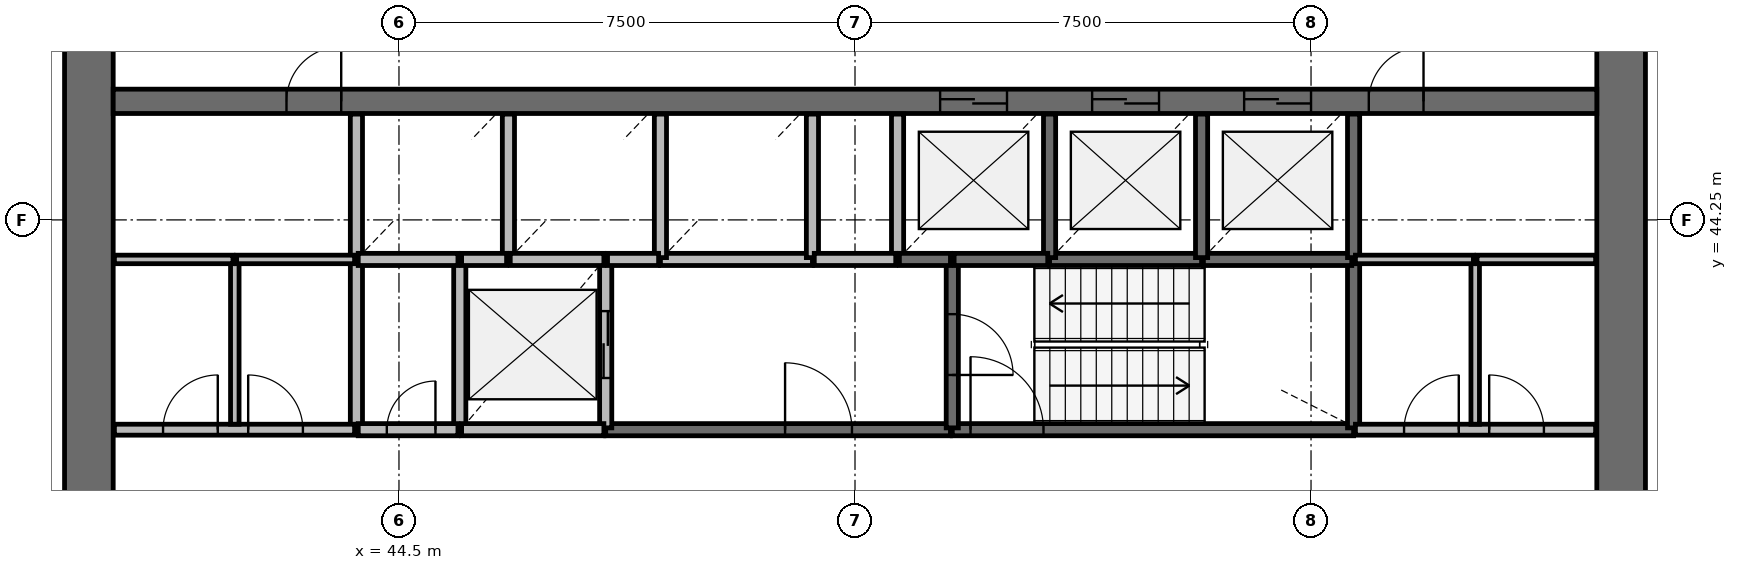
"""IFC4 building model, lengths in metres.
Left out: names, types, materials, properties, quantities, classifications, styles, units other than length and angle.
Written with IfcOpenShell. Run it as: python <this file> out.ifc"""

import sys

from ifc_helpers import new_model, si_unit, direction, frame, frame_2d, origin, place, context, subcontext, project, spatial, rectangle, extrude, source, transform, mapped, element, fill, save


model = new_model("IFC4")
c1 = context("Model", 3, precision=1e-05, world=origin(), true_north=direction((0.0, 1.0)))
c2 = subcontext(c1, "Body", "Model", "MODEL_VIEW")
j1 = project(units=[si_unit("LENGTHUNIT", "METRE"), si_unit("PLANEANGLEUNIT", "RADIAN")], contexts=[c1])
p1 = place(None, origin())
s1 = spatial("IfcSite", under=j1, at=p1, CompositionType="ELEMENT")
p2 = place(p1, origin())
s2 = spatial("IfcBuilding", under=s1, at=p2, CompositionType="ELEMENT")
p3 = place(p2, frame((0.0, 0.0, 137.0)))
s3 = spatial("IfcBuildingStorey", under=s2, at=p3, CompositionType="ELEMENT", Elevation=137.0)
p4 = place(p3, frame((64.6, 38.0, 0.0), z_axis=(0.0, 0.0, 1.0), x_axis=(0.0, 1.0, 0.0)))
e1 = element("IfcWall", 1, at=p4, inside=s3, PredefinedType="SHEAR", context=c2, shape_type="SweptSolid", body=[
    extrude(rectangle(XDim=20.0, YDim=0.8, at=frame_2d((10.0, 0.0))), origin(), (0.0, 0.0, 1.0), 3.9),
])
p5 = place(p4, frame((9.1, 0.0, 0.0)))
e2 = element("IfcOpeningElement", 2, at=p5, cuts=e1, PredefinedType="OPENING", context=c2, shape_type="SweptSolid", body=[
    extrude(rectangle(XDim=1.8, YDim=2.1, at=frame_2d((0.9, 1.05))), frame((0.0, 0.41, 0.0), z_axis=(0.0, -1.0, 0.0), x_axis=(1.0, 0.0, 0.0)), (0.0, 0.0, 1.0), 0.82),
])
p6 = place(p3, frame((39.4, 58.0, 0.0), z_axis=(0.0, 0.0, 1.0), x_axis=(0.0, -1.0, 0.0)))
e3 = element("IfcWall", 3, at=p6, inside=s3, PredefinedType="SHEAR", context=c2, shape_type="SweptSolid", body=[
    extrude(rectangle(XDim=20.0, YDim=0.8, at=frame_2d((10.0, 0.0))), origin(), (0.0, 0.0, 1.0), 3.9),
])
p7 = place(p6, frame((9.1, 0.0, 0.0)))
e4 = element("IfcOpeningElement", 4, at=p7, cuts=e3, PredefinedType="OPENING", context=c2, shape_type="SweptSolid", body=[
    extrude(rectangle(XDim=1.8, YDim=2.1, at=frame_2d((0.9, 1.05))), frame((0.0, 0.41, 0.0), z_axis=(0.0, -1.0, 0.0), x_axis=(1.0, 0.0, 0.0)), (0.0, 0.0, 1.0), 0.82),
])
p8 = place(p3, frame((39.8, 46.2, 0.0), z_axis=(0.0, 0.0, 1.0), x_axis=(1.0, 0.0, 0.0)))
e5 = element("IfcWall", 5, at=p8, inside=s3, PredefinedType="SHEAR", context=c2, shape_type="SweptSolid", body=[
    extrude(rectangle(XDim=24.4, YDim=0.4, at=frame_2d((12.2, 0.0))), origin(), (0.0, 0.0, 1.0), 3.9),
])
p9 = place(p8, frame((13.6, 0.0, 0.0)))
e6 = element("IfcOpeningElement", 6, at=p9, cuts=e5, PredefinedType="OPENING", context=c2, shape_type="SweptSolid", body=[
    extrude(rectangle(XDim=1.1, YDim=2.1, at=frame_2d((0.55, 1.05))), frame((0.0, 0.21, 0.0), z_axis=(0.0, -1.0, 0.0), x_axis=(1.0, 0.0, 0.0)), (0.0, 0.0, 1.0), 0.42),
])
p10 = place(p8, frame((16.1, 0.0, 0.0)))
e7 = element("IfcOpeningElement", 7, at=p10, cuts=e5, PredefinedType="OPENING", context=c2, shape_type="SweptSolid", body=[
    extrude(rectangle(XDim=1.1, YDim=2.1, at=frame_2d((0.55, 1.05))), frame((0.0, 0.21, 0.0), z_axis=(0.0, -1.0, 0.0), x_axis=(1.0, 0.0, 0.0)), (0.0, 0.0, 1.0), 0.42),
])
p11 = place(p8, frame((18.6, 0.0, 0.0)))
e8 = element("IfcOpeningElement", 8, at=p11, cuts=e5, PredefinedType="OPENING", context=c2, shape_type="SweptSolid", body=[
    extrude(rectangle(XDim=1.1, YDim=2.1, at=frame_2d((0.55, 1.05))), frame((0.0, 0.21, 0.0), z_axis=(0.0, -1.0, 0.0), x_axis=(1.0, 0.0, 0.0)), (0.0, 0.0, 1.0), 0.42),
])
p12 = place(p8, frame((20.65, 0.0, 0.0)))
e9 = element("IfcOpeningElement", 9, at=p12, cuts=e5, PredefinedType="OPENING", context=c2, shape_type="SweptSolid", body=[
    extrude(rectangle(XDim=0.9, YDim=2.1, at=frame_2d((0.45, 1.05))), frame((0.0, 0.21, 0.0), z_axis=(0.0, -1.0, 0.0), x_axis=(1.0, 0.0, 0.0)), (0.0, 0.0, 1.0), 0.42),
])
p13 = place(p8, frame((2.85, 0.0, 0.0)))
e10 = element("IfcOpeningElement", 10, at=p13, cuts=e5, PredefinedType="OPENING", context=c2, shape_type="SweptSolid", body=[
    extrude(rectangle(XDim=0.9, YDim=2.1, at=frame_2d((0.45, 1.05))), frame((0.0, 0.21, 0.0), z_axis=(0.0, -1.0, 0.0), x_axis=(1.0, 0.0, 0.0)), (0.0, 0.0, 1.0), 0.42),
])
p14 = place(p3, frame((53.6, 40.8, 0.0), z_axis=(0.0, 0.0, 1.0), x_axis=(1.0, 0.0, 0.0)))
e11 = element("IfcWall", 11, at=p14, inside=s3, PredefinedType="SOLIDWALL", context=c2, shape_type="SweptSolid", body=[
    extrude(rectangle(XDim=6.6, YDim=0.2, at=frame_2d((3.3, 0.0))), origin(), (0.0, 0.0, 1.0), 3.58),
])
p15 = place(p14, frame((0.3, 0.0, 0.0)))
e12 = element("IfcOpeningElement", 12, at=p15, cuts=e11, PredefinedType="OPENING", context=c2, shape_type="SweptSolid", body=[
    extrude(rectangle(XDim=1.2, YDim=2.1, at=frame_2d((0.6, 1.05))), frame((0.0, 0.11, 0.0), z_axis=(0.0, -1.0, 0.0), x_axis=(1.0, 0.0, 0.0)), (0.0, 0.0, 1.0), 0.22),
])
p16 = place(p3, frame((47.9, 40.8, 0.0), z_axis=(0.0, 0.0, 1.0), x_axis=(1.0, 0.0, 0.0)))
e13 = element("IfcWall", 13, at=p16, inside=s3, PredefinedType="SOLIDWALL", context=c2, shape_type="SweptSolid", body=[
    extrude(rectangle(XDim=5.67, YDim=0.2, at=frame_2d((2.835, 0.0))), origin(), (0.0, 0.0, 1.0), 3.58),
])
p17 = place(p16, frame((2.95, 0.0, 0.0)))
e14 = element("IfcOpeningElement", 14, at=p17, cuts=e13, PredefinedType="OPENING", context=c2, shape_type="SweptSolid", body=[
    extrude(rectangle(XDim=1.1, YDim=2.1, at=frame_2d((0.55, 1.05))), frame((0.0, 0.11, 0.0), z_axis=(0.0, -1.0, 0.0), x_axis=(1.0, 0.0, 0.0)), (0.0, 0.0, 1.0), 0.22),
])
for number, where, z_axis, x_axis in (
    (15, (43.8, 43.6, 0.0), (0.0, 0.0, 1.0), (0.0, -1.0, 0.0)),
    (16, (45.5, 43.6, 0.0), (0.0, 0.0, 1.0), (0.0, -1.0, 0.0)),
):
    element("IfcWall", number, at=place(p3, frame(where, z_axis=z_axis, x_axis=x_axis)), inside=s3, PredefinedType="SOLIDWALL", context=c2, shape_type="SweptSolid", body=[
        extrude(rectangle(XDim=2.8, YDim=0.2, at=frame_2d((1.4, 0.0))), origin(), (0.0, 0.0, 1.0), 3.58),
    ])
p18 = place(p3, frame((47.9, 40.83, 0.0), z_axis=(0.0, 0.0, 1.0), x_axis=(0.0, 1.0, 0.0)))
e17 = element("IfcWall", 17, at=p18, inside=s3, PredefinedType="SOLIDWALL", context=c2, shape_type="SweptSolid", body=[
    extrude(rectangle(XDim=2.77, YDim=0.2, at=frame_2d((1.385, 0.0))), origin(), (0.0, 0.0, 1.0), 3.58),
])
p19 = place(p18, frame((0.82, 0.0, 0.0)))
e18 = element("IfcOpeningElement", 18, at=p19, cuts=e17, PredefinedType="OPENING", context=c2, shape_type="SweptSolid", body=[
    extrude(rectangle(XDim=1.1, YDim=2.1, at=frame_2d((0.55, 1.05))), frame((0.0, 0.11, 0.0), z_axis=(0.0, -1.0, 0.0), x_axis=(1.0, 0.0, 0.0)), (0.0, 0.0, 1.0), 0.22),
])
p20 = place(p3, frame((60.2, 40.83, 0.0), z_axis=(0.0, 0.0, 1.0), x_axis=(0.0, 1.0, 0.0)))
e19 = element("IfcWall", 19, at=p20, inside=s3, PredefinedType="SOLIDWALL", context=c2, shape_type="SweptSolid", body=[
    extrude(rectangle(XDim=2.77, YDim=0.2, at=frame_2d((1.385, 0.0))), origin(), (0.0, 0.0, 1.0), 3.58),
])
p21 = place(p3, frame((53.6, 43.6, 0.0), z_axis=(0.0, 0.0, 1.0), x_axis=(0.0, -1.0, 0.0)))
e20 = element("IfcWall", 20, at=p21, inside=s3, PredefinedType="SOLIDWALL", context=c2, shape_type="SweptSolid", body=[
    extrude(rectangle(XDim=2.77, YDim=0.2, at=frame_2d((1.385, 0.0))), origin(), (0.0, 0.0, 1.0), 3.58),
])
p22 = place(p21, frame((0.9, 0.0, 0.0)))
e21 = element("IfcOpeningElement", 21, at=p22, cuts=e20, PredefinedType="OPENING", context=c2, shape_type="SweptSolid", body=[
    extrude(rectangle(XDim=1.0, YDim=2.1, at=frame_2d((0.5, 1.05))), frame((0.0, 0.11, 0.0), z_axis=(0.0, -1.0, 0.0), x_axis=(1.0, 0.0, 0.0)), (0.0, 0.0, 1.0), 0.22),
])
for number, where, z_axis, x_axis in (
    (22, (48.8, 43.6, 0.0), (0.0, 0.0, 1.0), (1.0, 0.0, 0.0)),
    (23, (55.2, 43.6, 0.0), (0.0, 0.0, 1.0), (1.0, 0.0, 0.0)),
):
    element("IfcWall", number, at=place(p3, frame(where, z_axis=z_axis, x_axis=x_axis)), inside=s3, PredefinedType="SOLIDWALL", context=c2, shape_type="SweptSolid", body=[
        extrude(rectangle(XDim=2.5, YDim=0.2, at=frame_2d((1.25, 0.0))), origin(), (0.0, 0.0, 1.0), 3.58),
    ])
p23 = place(p3, frame((57.73, 43.6, 0.0), z_axis=(0.0, 0.0, 1.0), x_axis=(1.0, 0.0, 0.0)))
e24 = element("IfcWall", 24, at=p23, inside=s3, PredefinedType="SOLIDWALL", context=c2, shape_type="SweptSolid", body=[
    extrude(rectangle(XDim=2.44, YDim=0.2, at=frame_2d((1.22, 0.0))), origin(), (0.0, 0.0, 1.0), 3.58),
])
p24 = place(p3, frame((45.53, 40.8, 0.0), z_axis=(0.0, 0.0, 1.0), x_axis=(1.0, 0.0, 0.0)))
e25 = element("IfcWall", 25, at=p24, inside=s3, PredefinedType="SOLIDWALL", context=c2, shape_type="SweptSolid", body=[
    extrude(rectangle(XDim=2.34, YDim=0.2, at=frame_2d((1.17, 0.0))), origin(), (0.0, 0.0, 1.0), 3.58),
])
p25 = place(p3, frame((43.8, 45.99, 0.0), z_axis=(0.0, 0.0, 1.0), x_axis=(0.0, -1.0, 0.0)))
e26 = element("IfcWall", 26, at=p25, inside=s3, PredefinedType="SOLIDWALL", context=c2, shape_type="SweptSolid", body=[
    extrude(rectangle(XDim=2.36, YDim=0.2, at=frame_2d((1.18, 0.0))), origin(), (0.0, 0.0, 1.0), 3.58),
])
p26 = place(p3, frame((46.3, 43.6, 0.0), z_axis=(0.0, 0.0, 1.0), x_axis=(0.0, 1.0, 0.0)))
e27 = element("IfcWall", 27, at=p26, inside=s3, PredefinedType="SOLIDWALL", context=c2, shape_type="SweptSolid", body=[
    extrude(rectangle(XDim=2.39, YDim=0.2, at=frame_2d((1.195, 0.0))), origin(), (0.0, 0.0, 1.0), 3.58),
])
for number, where, z_axis, x_axis in (
    (28, (48.8, 43.63, 0.0), (0.0, 0.0, 1.0), (0.0, 1.0, 0.0)),
    (29, (51.3, 43.63, 0.0), (0.0, 0.0, 1.0), (0.0, 1.0, 0.0)),
):
    element("IfcWall", number, at=place(p3, frame(where, z_axis=z_axis, x_axis=x_axis)), inside=s3, PredefinedType="SOLIDWALL", context=c2, shape_type="SweptSolid", body=[
        extrude(rectangle(XDim=2.36, YDim=0.2, at=frame_2d((1.18, 0.0))), origin(), (0.0, 0.0, 1.0), 3.58),
    ])
p27 = place(p3, frame((52.7, 45.99, 0.0), z_axis=(0.0, 0.0, 1.0), x_axis=(0.0, -1.0, 0.0)))
e30 = element("IfcWall", 30, at=p27, inside=s3, PredefinedType="SOLIDWALL", context=c2, shape_type="SweptSolid", body=[
    extrude(rectangle(XDim=2.39, YDim=0.2, at=frame_2d((1.195, 0.0))), origin(), (0.0, 0.0, 1.0), 3.58),
])
for number, where, z_axis, x_axis in (
    (31, (55.2, 43.63, 0.0), (0.0, 0.0, 1.0), (0.0, 1.0, 0.0)),
    (32, (57.7, 43.63, 0.0), (0.0, 0.0, 1.0), (0.0, 1.0, 0.0)),
    (33, (60.2, 43.63, 0.0), (0.0, 0.0, 1.0), (0.0, 1.0, 0.0)),
):
    element("IfcWall", number, at=place(p3, frame(where, z_axis=z_axis, x_axis=x_axis)), inside=s3, PredefinedType="SOLIDWALL", context=c2, shape_type="SweptSolid", body=[
        extrude(rectangle(XDim=2.36, YDim=0.2, at=frame_2d((1.18, 0.0))), origin(), (0.0, 0.0, 1.0), 3.58),
    ])
p28 = place(p3, frame((43.83, 43.6, 0.0), z_axis=(0.0, 0.0, 1.0), x_axis=(1.0, 0.0, 0.0)))
e34 = element("IfcWall", 34, at=p28, inside=s3, PredefinedType="SOLIDWALL", context=c2, shape_type="SweptSolid", body=[
    extrude(rectangle(XDim=1.64, YDim=0.2, at=frame_2d((0.82, 0.0))), origin(), (0.0, 0.0, 1.0), 3.58),
])
p29 = place(p3, frame((43.83, 40.8, 0.0), z_axis=(0.0, 0.0, 1.0), x_axis=(1.0, 0.0, 0.0)))
e35 = element("IfcWall", 35, at=p29, inside=s3, PredefinedType="SOLIDWALL", context=c2, shape_type="SweptSolid", body=[
    extrude(rectangle(XDim=1.64, YDim=0.2, at=frame_2d((0.82, 0.0))), origin(), (0.0, 0.0, 1.0), 3.58),
])
p30 = place(p29, frame((0.47, 0.0, 0.0)))
e36 = element("IfcOpeningElement", 36, at=p30, cuts=e35, PredefinedType="OPENING", context=c2, shape_type="SweptSolid", body=[
    extrude(rectangle(XDim=0.8, YDim=2.1, at=frame_2d((0.4, 1.05))), frame((0.0, 0.11, 0.0), z_axis=(0.0, -1.0, 0.0), x_axis=(1.0, 0.0, 0.0)), (0.0, 0.0, 1.0), 0.22),
])
for number, where, z_axis, x_axis in (
    (37, (46.33, 43.6, 0.0), (0.0, 0.0, 1.0), (1.0, 0.0, 0.0)),
    (38, (53.63, 43.6, 0.0), (0.0, 0.0, 1.0), (1.0, 0.0, 0.0)),
):
    element("IfcWall", number, at=place(p3, frame(where, z_axis=z_axis, x_axis=x_axis)), inside=s3, PredefinedType="SOLIDWALL", context=c2, shape_type="SweptSolid", body=[
        extrude(rectangle(XDim=1.54, YDim=0.2, at=frame_2d((0.77, 0.0))), origin(), (0.0, 0.0, 1.0), 3.58),
    ])
p31 = place(p3, frame((52.67, 43.6, 0.0), z_axis=(0.0, 0.0, 1.0), x_axis=(-1.0, 0.0, 0.0)))
e39 = element("IfcWall", 39, at=p31, inside=s3, PredefinedType="SOLIDWALL", context=c2, shape_type="SweptSolid", body=[
    extrude(rectangle(XDim=1.34, YDim=0.2, at=frame_2d((0.67, 0.0))), origin(), (0.0, 0.0, 1.0), 3.58),
])
for number, where, z_axis, x_axis in (
    (40, (47.93, 43.6, 0.0), (0.0, 0.0, 1.0), (1.0, 0.0, 0.0)),
    (41, (52.73, 43.6, 0.0), (0.0, 0.0, 1.0), (1.0, 0.0, 0.0)),
):
    element("IfcWall", number, at=place(p3, frame(where, z_axis=z_axis, x_axis=x_axis)), inside=s3, PredefinedType="SOLIDWALL", context=c2, shape_type="SweptSolid", body=[
        extrude(rectangle(XDim=0.84, YDim=0.2, at=frame_2d((0.42, 0.0))), origin(), (0.0, 0.0, 1.0), 3.58),
    ])
p32 = place(p3, frame((45.53, 43.6, 0.0), z_axis=(0.0, 0.0, 1.0), x_axis=(1.0, 0.0, 0.0)))
e42 = element("IfcWall", 42, at=p32, inside=s3, PredefinedType="SOLIDWALL", context=c2, shape_type="SweptSolid", body=[
    extrude(rectangle(XDim=0.74, YDim=0.2, at=frame_2d((0.37, 0.0))), origin(), (0.0, 0.0, 1.0), 3.58),
])
p33 = place(p3, frame((60.23, 40.8, 0.0), z_axis=(0.0, 0.0, 1.0), x_axis=(1.0, 0.0, 0.0)))
e43 = element("IfcWall", 43, at=p33, inside=s3, PredefinedType="PARTITIONING", context=c2, shape_type="SweptSolid", body=[
    extrude(rectangle(XDim=3.95, YDim=0.18, at=frame_2d((1.975, 0.0))), origin(), (0.0, 0.0, 1.0), 2.7),
])
p34 = place(p33, frame((0.8, 0.0, 0.0)))
e44 = element("IfcOpeningElement", 44, at=p34, cuts=e43, PredefinedType="OPENING", context=c2, shape_type="SweptSolid", body=[
    extrude(rectangle(XDim=0.9, YDim=2.1, at=frame_2d((0.45, 1.05))), frame((0.0, 0.1, 0.0), z_axis=(0.0, -1.0, 0.0), x_axis=(1.0, 0.0, 0.0)), (0.0, 0.0, 1.0), 0.2),
])
p35 = place(p33, frame((2.2, 0.0, 0.0)))
e45 = element("IfcOpeningElement", 45, at=p35, cuts=e43, PredefinedType="OPENING", context=c2, shape_type="SweptSolid", body=[
    extrude(rectangle(XDim=0.9, YDim=2.1, at=frame_2d((0.45, 1.05))), frame((0.0, 0.1, 0.0), z_axis=(0.0, -1.0, 0.0), x_axis=(1.0, 0.0, 0.0)), (0.0, 0.0, 1.0), 0.2),
])
p36 = place(p3, frame((39.82, 40.8, 0.0), z_axis=(0.0, 0.0, 1.0), x_axis=(1.0, 0.0, 0.0)))
e46 = element("IfcWall", 46, at=p36, inside=s3, PredefinedType="PARTITIONING", context=c2, shape_type="SweptSolid", body=[
    extrude(rectangle(XDim=3.95, YDim=0.18, at=frame_2d((1.975, 0.0))), origin(), (0.0, 0.0, 1.0), 2.7),
])
p37 = place(p36, frame((0.8, 0.0, 0.0)))
e47 = element("IfcOpeningElement", 47, at=p37, cuts=e46, PredefinedType="OPENING", context=c2, shape_type="SweptSolid", body=[
    extrude(rectangle(XDim=0.9, YDim=2.1, at=frame_2d((0.45, 1.05))), frame((0.0, 0.1, 0.0), z_axis=(0.0, -1.0, 0.0), x_axis=(1.0, 0.0, 0.0)), (0.0, 0.0, 1.0), 0.2),
])
p38 = place(p36, frame((2.2, 0.0, 0.0)))
e48 = element("IfcOpeningElement", 48, at=p38, cuts=e46, PredefinedType="OPENING", context=c2, shape_type="SweptSolid", body=[
    extrude(rectangle(XDim=0.9, YDim=2.1, at=frame_2d((0.45, 1.05))), frame((0.0, 0.1, 0.0), z_axis=(0.0, -1.0, 0.0), x_axis=(1.0, 0.0, 0.0)), (0.0, 0.0, 1.0), 0.2),
])
for number, where, z_axis, x_axis in (
    (49, (41.8, 40.89, 0.0), (0.0, 0.0, 1.0), (0.0, 1.0, 0.0)),
    (50, (62.2, 40.89, 0.0), (0.0, 0.0, 1.0), (0.0, 1.0, 0.0)),
):
    element("IfcWall", number, at=place(p3, frame(where, z_axis=z_axis, x_axis=x_axis)), inside=s3, PredefinedType="PARTITIONING", context=c2, shape_type="SweptSolid", body=[
        extrude(rectangle(XDim=2.71, YDim=0.14, at=frame_2d((1.355, 0.0))), origin(), (0.0, 0.0, 1.0), 2.88),
    ])
for number, where, z_axis, x_axis in (
    (51, (43.77, 43.6, 0.0), (0.0, 0.0, 1.0), (-1.0, 0.0, 0.0)),
    (52, (60.23, 43.6, 0.0), (0.0, 0.0, 1.0), (1.0, 0.0, 0.0)),
):
    element("IfcWall", number, at=place(p3, frame(where, z_axis=z_axis, x_axis=x_axis)), inside=s3, PredefinedType="PARTITIONING", context=c2, shape_type="SweptSolid", body=[
        extrude(rectangle(XDim=1.94, YDim=0.14, at=frame_2d((0.97, 0.0))), origin(), (0.0, 0.0, 1.0), 2.88),
    ])
for number, where, z_axis, x_axis in (
    (53, (62.23, 43.6, 0.0), (0.0, 0.0, 1.0), (1.0, 0.0, 0.0)),
    (54, (41.77, 43.6, 0.0), (0.0, 0.0, 1.0), (-1.0, 0.0, 0.0)),
):
    element("IfcWall", number, at=place(p3, frame(where, z_axis=z_axis, x_axis=x_axis)), inside=s3, PredefinedType="PARTITIONING", context=c2, shape_type="SweptSolid", body=[
        extrude(rectangle(XDim=1.95, YDim=0.14, at=frame_2d((0.975, 0.0))), origin(), (0.0, 0.0, 1.0), 2.88),
    ])
m1 = source(origin(), c2, "Body", "SweptSolid", [
    extrude(rectangle(XDim=1.1, YDim=2.1, at=frame_2d((0.55, 1.05))), frame((0.0, 0.025, 0.0), z_axis=(0.0, -1.0, 0.0), x_axis=(1.0, 0.0, 0.0)), (0.0, 0.0, 1.0), 0.05),
])
p39 = place(p9, origin())
e55 = element("IfcDoor", 55, at=p39, inside=s3, OperationType="DOUBLE_DOOR_SLIDING", PredefinedType="USERDEFINED", context=c2, shape_type="MappedRepresentation", body=[
    mapped(m1, transform((0.0, 0.0, 0.0), scale=1.0)),
])
fill(e6, e55)
p40 = place(p10, origin())
e56 = element("IfcDoor", 56, at=p40, inside=s3, OperationType="DOUBLE_DOOR_SLIDING", PredefinedType="USERDEFINED", context=c2, shape_type="MappedRepresentation", body=[
    mapped(m1, transform((0.0, 0.0, 0.0), scale=1.0)),
])
fill(e7, e56)
p41 = place(p11, origin())
e57 = element("IfcDoor", 57, at=p41, inside=s3, OperationType="DOUBLE_DOOR_SLIDING", PredefinedType="USERDEFINED", context=c2, shape_type="MappedRepresentation", body=[
    mapped(m1, transform((0.0, 0.0, 0.0), scale=1.0)),
])
fill(e8, e57)
p42 = place(p19, origin())
e58 = element("IfcDoor", 58, at=p42, inside=s3, OperationType="DOUBLE_DOOR_SLIDING", PredefinedType="USERDEFINED", context=c2, shape_type="MappedRepresentation", body=[
    mapped(m1, transform((0.0, 0.0, 0.0), scale=1.0)),
])
fill(e18, e58)
m2 = source(origin(), c2, "Body", "SweptSolid", [
    extrude(rectangle(XDim=1.2, YDim=2.1, at=frame_2d((0.6, 1.05))), frame((0.0, 0.025, 0.0), z_axis=(0.0, -1.0, 0.0), x_axis=(1.0, 0.0, 0.0)), (0.0, 0.0, 1.0), 0.05),
])
p43 = place(p15, origin())
e59 = element("IfcDoor", 59, at=p43, inside=s3, OperationType="SINGLE_SWING_LEFT", PredefinedType="DOOR", context=c2, shape_type="MappedRepresentation", body=[
    mapped(m2, transform((0.0, 0.0, 0.0), scale=1.0)),
])
fill(e12, e59)
m3 = source(origin(), c2, "Body", "SweptSolid", [
    extrude(rectangle(XDim=1.0, YDim=2.1, at=frame_2d((0.5, 1.05))), frame((0.0, 0.025, 0.0), z_axis=(0.0, -1.0, 0.0), x_axis=(1.0, 0.0, 0.0)), (0.0, 0.0, 1.0), 0.05),
])
p44 = place(p22, origin())
e60 = element("IfcDoor", 60, at=p44, inside=s3, OperationType="SINGLE_SWING_RIGHT", PredefinedType="DOOR", context=c2, shape_type="MappedRepresentation", body=[
    mapped(m3, transform((0.0, 0.0, 0.0), scale=1.0)),
])
fill(e21, e60)
m4 = source(origin(), c2, "Body", "SweptSolid", [
    extrude(rectangle(XDim=1.1, YDim=2.1, at=frame_2d((0.55, 1.05))), frame((0.0, 0.025, 0.0), z_axis=(0.0, -1.0, 0.0), x_axis=(1.0, 0.0, 0.0)), (0.0, 0.0, 1.0), 0.05),
])
p45 = place(p17, origin())
e61 = element("IfcDoor", 61, at=p45, inside=s3, OperationType="SINGLE_SWING_LEFT", PredefinedType="DOOR", context=c2, shape_type="MappedRepresentation", body=[
    mapped(m4, transform((0.0, 0.0, 0.0), scale=1.0)),
])
fill(e14, e61)
m5 = source(origin(), c2, "Body", "SweptSolid", [
    extrude(rectangle(XDim=0.8, YDim=2.1, at=frame_2d((0.4, 1.05))), frame((0.0, 0.025, 0.0), z_axis=(0.0, -1.0, 0.0), x_axis=(1.0, 0.0, 0.0)), (0.0, 0.0, 1.0), 0.05),
])
p46 = place(p30, origin())
e62 = element("IfcDoor", 62, at=p46, inside=s3, OperationType="SINGLE_SWING_RIGHT", PredefinedType="DOOR", context=c2, shape_type="MappedRepresentation", body=[
    mapped(m5, transform((0.0, 0.0, 0.0), scale=1.0)),
])
fill(e36, e62)
m6 = source(origin(), c2, "Body", "SweptSolid", [
    extrude(rectangle(XDim=0.9, YDim=2.1, at=frame_2d((0.45, 1.05))), frame((0.0, 0.025, 0.0), z_axis=(0.0, -1.0, 0.0), x_axis=(1.0, 0.0, 0.0)), (0.0, 0.0, 1.0), 0.05),
])
p47 = place(p37, origin())
e63 = element("IfcDoor", 63, at=p47, inside=s3, OperationType="SINGLE_SWING_RIGHT", PredefinedType="DOOR", context=c2, shape_type="MappedRepresentation", body=[
    mapped(m6, transform((0.0, 0.0, 0.0), scale=1.0)),
])
fill(e47, e63)
p48 = place(p38, origin())
e64 = element("IfcDoor", 64, at=p48, inside=s3, OperationType="SINGLE_SWING_LEFT", PredefinedType="DOOR", context=c2, shape_type="MappedRepresentation", body=[
    mapped(m6, transform((0.0, 0.0, 0.0), scale=1.0)),
])
fill(e48, e64)
p49 = place(p12, origin())
e65 = element("IfcDoor", 65, at=p49, inside=s3, OperationType="SINGLE_SWING_RIGHT", PredefinedType="DOOR", context=c2, shape_type="MappedRepresentation", body=[
    mapped(m6, transform((0.0, 0.0, 0.0), scale=1.0)),
])
fill(e9, e65)
p50 = place(p34, origin())
e66 = element("IfcDoor", 66, at=p50, inside=s3, OperationType="SINGLE_SWING_RIGHT", PredefinedType="DOOR", context=c2, shape_type="MappedRepresentation", body=[
    mapped(m6, transform((0.0, 0.0, 0.0), scale=1.0)),
])
fill(e44, e66)
p51 = place(p35, origin())
e67 = element("IfcDoor", 67, at=p51, inside=s3, OperationType="SINGLE_SWING_LEFT", PredefinedType="DOOR", context=c2, shape_type="MappedRepresentation", body=[
    mapped(m6, transform((0.0, 0.0, 0.0), scale=1.0)),
])
fill(e45, e67)
p52 = place(p13, origin())
e68 = element("IfcDoor", 68, at=p52, inside=s3, OperationType="SINGLE_SWING_RIGHT", PredefinedType="DOOR", context=c2, shape_type="MappedRepresentation", body=[
    mapped(m6, transform((0.0, 0.0, 0.0), scale=1.0)),
])
fill(e10, e68)
save(model, sys.argv[1])
